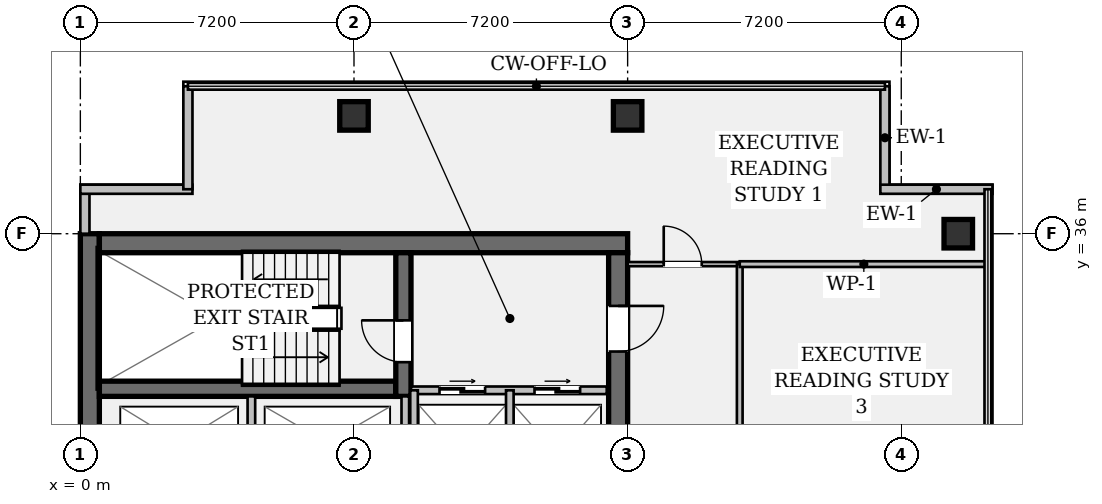
"""IFC4 building model, lengths in metres.
Left out: names, types, materials, properties, quantities, classifications, styles, units other than length and angle.
Written with IfcOpenShell. Run it as: python <this file> out.ifc"""

import sys

from ifc_helpers import new_model, si_unit, direction, frame, frame_2d, origin, origin_2d, place, context, subcontext, project, spatial, rectangle, hollow_rectangle, extrude, element, fill, save


model = new_model("IFC4")
c1 = context("Model", 3, precision=1e-05, world=origin(), true_north=direction((0.0, 1.0)))
c2 = subcontext(c1, "Body", "Model", "MODEL_VIEW")
j1 = project(units=[si_unit("LENGTHUNIT", "METRE"), si_unit("PLANEANGLEUNIT", "RADIAN")], contexts=[c1])
p1 = place(None, origin())
s1 = spatial("IfcSite", under=j1, at=p1, CompositionType="ELEMENT")
p2 = place(p1, origin())
s2 = spatial("IfcBuilding", under=s1, at=p2, CompositionType="ELEMENT")
p3 = place(p2, frame((0.0, 0.0, 225.75)))
s3 = spatial("IfcBuildingStorey", under=s2, at=p3, CompositionType="ELEMENT", Elevation=225.75)
p4 = place(p3, frame((0.25, 7.2, 0.0), z_axis=(0.0, 0.0, 1.0), x_axis=(0.0, 1.0, 0.0)))
e1 = element("IfcWall", 1, at=p4, inside=s3, PredefinedType="SHEAR", context=c2, shape_type="SweptSolid", body=[
    extrude(rectangle(XDim=28.8, YDim=0.5, at=frame_2d((14.4, 0.0))), origin(), (0.0, 0.0, 1.0), 3.24),
])
p5 = place(p3, frame((0.5, 35.75, 0.0), z_axis=(0.0, 0.0, 1.0), x_axis=(1.0, 0.0, 0.0)))
e2 = element("IfcWall", 2, at=p5, inside=s3, PredefinedType="SHEAR", context=c2, shape_type="SweptSolid", body=[
    extrude(rectangle(XDim=13.9, YDim=0.5, at=frame_2d((6.95, 0.0))), origin(), (0.0, 0.0, 1.0), 3.24),
])
p6 = place(p3, frame((14.15, 35.5, 0.0), z_axis=(0.0, 0.0, 1.0), x_axis=(0.0, -1.0, 0.0)))
e3 = element("IfcWall", 3, at=p6, inside=s3, PredefinedType="SHEAR", context=c2, shape_type="SweptSolid", body=[
    extrude(rectangle(XDim=27.8, YDim=0.5, at=frame_2d((13.9, 0.0))), origin(), (0.0, 0.0, 1.0), 3.24),
])
p7 = place(p6, frame((1.4, 0.0, 0.0)))
e4 = element("IfcOpeningElement", 4, at=p7, cuts=e3, PredefinedType="OPENING", context=c2, shape_type="SweptSolid", body=[
    extrude(rectangle(XDim=1.2, YDim=2.15, at=frame_2d((0.6, 1.075))), frame((0.0, 0.262, 0.0), z_axis=(0.0, -1.0, 0.0), x_axis=(1.0, 0.0, 0.0)), (0.0, 0.0, 1.0), 0.524),
])
p8 = place(p6, frame((25.35, 0.0, 0.0)))
e5 = element("IfcOpeningElement", 5, at=p8, cuts=e3, PredefinedType="OPENING", context=c2, shape_type="SweptSolid", body=[
    extrude(rectangle(XDim=1.2, YDim=2.15, at=frame_2d((0.6, 1.075))), frame((0.0, 0.262, 0.0), z_axis=(0.0, -1.0, 0.0), x_axis=(1.0, 0.0, 0.0)), (0.0, 0.0, 1.0), 0.524),
])
p9 = place(p6, frame((14.7, 0.0, 0.0)))
e6 = element("IfcOpeningElement", 6, at=p9, cuts=e3, PredefinedType="OPENING", context=c2, shape_type="SweptSolid", body=[
    extrude(rectangle(XDim=1.6, YDim=2.2, at=frame_2d((0.8, 1.1))), frame((0.0, 0.262, 0.0), z_axis=(0.0, -1.0, 0.0), x_axis=(1.0, 0.0, 0.0)), (0.0, 0.0, 1.0), 0.524),
])
p10 = place(p3, frame((0.5, 31.92, 0.0), z_axis=(0.0, 0.0, 1.0), x_axis=(1.0, 0.0, 0.0)))
e7 = element("IfcWall", 7, at=p10, inside=s3, PredefinedType="SHEAR", context=c2, shape_type="SweptSolid", body=[
    extrude(rectangle(XDim=7.8, YDim=0.4, at=frame_2d((3.9, 0.0))), origin(), (0.0, 0.0, 1.0), 3.24),
])
p11 = place(p3, frame((8.5, 31.72, 0.0), z_axis=(0.0, 0.0, 1.0), x_axis=(0.0, 1.0, 0.0)))
e8 = element("IfcWall", 8, at=p11, inside=s3, PredefinedType="SHEAR", context=c2, shape_type="SweptSolid", body=[
    extrude(rectangle(XDim=3.78, YDim=0.4, at=frame_2d((1.89, 0.0))), origin(), (0.0, 0.0, 1.0), 3.24),
])
p12 = place(p11, frame((0.9, 0.0, 0.0)))
e9 = element("IfcOpeningElement", 9, at=p12, cuts=e8, PredefinedType="OPENING", context=c2, shape_type="SweptSolid", body=[
    extrude(rectangle(XDim=1.1, YDim=2.15, at=frame_2d((0.55, 1.075))), frame((0.0, 0.212, 0.0), z_axis=(0.0, -1.0, 0.0), x_axis=(1.0, 0.0, 0.0)), (0.0, 0.0, 1.0), 0.424),
])
for number, where, z_axis, x_axis in (
    (10, (7.2, 39.1, 0.0), (0.0, 0.0, 1.0), (1.0, 0.0, 0.0)),
    (11, (14.4, 39.1, 0.0), (0.0, 0.0, 1.0), (1.0, 0.0, 0.0)),
    (12, (23.1, 36.0, 0.0), (0.0, 0.0, 1.0), (1.0, 0.0, 0.0)),
):
    element("IfcColumn", number, at=place(p3, frame(where, z_axis=z_axis, x_axis=x_axis)), inside=s3, PredefinedType="COLUMN", context=c2, shape_type="SweptSolid", body=[
        extrude(hollow_rectangle(XDim=0.75, YDim=0.75, WallThickness=0.045, at=origin_2d()), origin(), (0.0, 0.0, 1.0), 3.24),
    ])
p13 = place(p3, frame((0.12, 36.0, 0.0), z_axis=(0.0, 0.0, 1.0), x_axis=(0.0, 1.0, 0.0)))
e13 = element("IfcWall", 13, at=p13, inside=s3, PredefinedType="STANDARD", context=c2, shape_type="SweptSolid", body=[
    extrude(rectangle(XDim=1.17, YDim=0.24, at=frame_2d((0.585, 0.0))), origin(), (0.0, 0.0, 1.0), 3.24),
])
p14 = place(p3, frame((0.0, 37.17, 0.0), z_axis=(0.0, 0.0, 1.0), x_axis=(1.0, 0.0, 0.0)))
e14 = element("IfcWall", 14, at=p14, inside=s3, PredefinedType="STANDARD", context=c2, shape_type="SweptSolid", body=[
    extrude(rectangle(XDim=2.95, YDim=0.24, at=frame_2d((1.475, 0.0))), origin(), (0.0, 0.0, 1.0), 3.24),
])
for number, where, z_axis, x_axis in (
    (15, (2.83, 37.17, 0.0), (0.0, 0.0, 1.0), (0.0, 1.0, 0.0)),
    (16, (21.17, 39.88, 0.0), (0.0, 0.0, 1.0), (0.0, -1.0, 0.0)),
):
    element("IfcWall", number, at=place(p3, frame(where, z_axis=z_axis, x_axis=x_axis)), inside=s3, PredefinedType="STANDARD", context=c2, shape_type="SweptSolid", body=[
        extrude(rectangle(XDim=2.71, YDim=0.24, at=frame_2d((1.355, 0.0))), origin(), (0.0, 0.0, 1.0), 3.24),
    ])
p15 = place(p3, frame((21.05, 37.17, 0.0), z_axis=(0.0, 0.0, 1.0), x_axis=(1.0, 0.0, 0.0)))
e17 = element("IfcWall", 17, at=p15, inside=s3, PredefinedType="STANDARD", context=c2, shape_type="SweptSolid", body=[
    extrude(rectangle(XDim=2.95, YDim=0.24, at=frame_2d((1.475, 0.0))), origin(), (0.0, 0.0, 1.0), 3.24),
])
p16 = place(p3, frame((8.7, 31.88, 0.0), z_axis=(0.0, 0.0, 1.0), x_axis=(1.0, 0.0, 0.0)))
e18 = element("IfcWall", 18, at=p16, inside=s3, PredefinedType="PARTITIONING", context=c2, shape_type="SweptSolid", body=[
    extrude(rectangle(XDim=5.15, YDim=0.2, at=frame_2d((2.575, 0.0))), origin(), (0.0, 0.0, 1.0), 3.24),
])
p17 = place(p16, frame((0.75, 0.0, 0.0)))
e19 = element("IfcOpeningElement", 19, at=p17, cuts=e18, PredefinedType="OPENING", context=c2, shape_type="SweptSolid", body=[
    extrude(rectangle(XDim=1.2, YDim=2.2, at=frame_2d((0.6, 1.1))), frame((0.0, 0.112, 0.0), z_axis=(0.0, -1.0, 0.0), x_axis=(1.0, 0.0, 0.0)), (0.0, 0.0, 1.0), 0.224),
])
p18 = place(p16, frame((3.25, 0.0, 0.0)))
e20 = element("IfcOpeningElement", 20, at=p18, cuts=e18, PredefinedType="OPENING", context=c2, shape_type="SweptSolid", body=[
    extrude(rectangle(XDim=1.2, YDim=2.2, at=frame_2d((0.6, 1.1))), frame((0.0, 0.112, 0.0), z_axis=(0.0, -1.0, 0.0), x_axis=(1.0, 0.0, 0.0)), (0.0, 0.0, 1.0), 0.224),
])
for number, where, z_axis, x_axis in (
    (21, (8.78, 28.78, 0.0), (0.0, 0.0, 1.0), (0.0, 1.0, 0.0)),
    (22, (11.3, 28.78, 0.0), (0.0, 0.0, 1.0), (0.0, 1.0, 0.0)),
):
    element("IfcWall", number, at=place(p3, frame(where, z_axis=z_axis, x_axis=x_axis)), inside=s3, PredefinedType="PARTITIONING", context=c2, shape_type="SweptSolid", body=[
        extrude(rectangle(XDim=3.1, YDim=0.2, at=frame_2d((1.55, 0.0))), origin(), (0.0, 0.0, 1.0), 3.24),
    ])
for number, where, z_axis, x_axis in (
    (23, (4.5, 28.78, 0.0), (0.0, 0.0, 1.0), (0.0, 1.0, 0.0)),
    (24, (8.55, 28.78, 0.0), (0.0, 0.0, 1.0), (0.0, 1.0, 0.0)),
):
    element("IfcWall", number, at=place(p3, frame(where, z_axis=z_axis, x_axis=x_axis)), inside=s3, PredefinedType="PARTITIONING", context=c2, shape_type="SweptSolid", body=[
        extrude(rectangle(XDim=2.94, YDim=0.2, at=frame_2d((1.47, 0.0))), origin(), (0.0, 0.0, 1.0), 3.24),
    ])
p19 = place(p3, frame((14.4, 35.2, 0.0), z_axis=(0.0, 0.0, 1.0), x_axis=(1.0, 0.0, 0.0)))
e25 = element("IfcWall", 25, at=p19, inside=s3, PredefinedType="PARTITIONING", context=c2, shape_type="SweptSolid", body=[
    extrude(rectangle(XDim=2.95, YDim=0.11, at=frame_2d((1.475, 0.0))), origin(), (0.0, 0.0, 1.0), 2.808),
])
p20 = place(p19, frame((0.95, 0.0, 0.0)))
e26 = element("IfcOpeningElement", 26, at=p20, cuts=e25, PredefinedType="OPENING", context=c2, shape_type="SweptSolid", body=[
    extrude(rectangle(XDim=1.0, YDim=2.15, at=frame_2d((0.5, 1.075))), frame((0.0, 0.067, 0.0), z_axis=(0.0, -1.0, 0.0), x_axis=(1.0, 0.0, 0.0)), (0.0, 0.0, 1.0), 0.134),
])
p21 = place(p3, frame((17.35, 12.15, 0.0), z_axis=(0.0, 0.0, 1.0), x_axis=(0.0, 1.0, 0.0)))
e27 = element("IfcWall", 27, at=p21, inside=s3, PredefinedType="PARTITIONING", context=c2, shape_type="SweptSolid", body=[
    extrude(rectangle(XDim=23.05, YDim=0.15, at=frame_2d((11.525, 0.0))), origin(), (0.0, 0.0, 1.0), 2.613),
])
p22 = place(p21, frame((4.3, 0.0, 0.0)))
e28 = element("IfcOpeningElement", 28, at=p22, cuts=e27, PredefinedType="OPENING", context=c2, shape_type="SweptSolid", body=[
    extrude(rectangle(XDim=0.88, YDim=2.15, at=frame_2d((0.44, 1.075))), frame((0.0, 0.087, 0.0), z_axis=(0.0, -1.0, 0.0), x_axis=(1.0, 0.0, 0.0)), (0.0, 0.0, 1.0), 0.174),
])
p23 = place(p21, frame((8.0, 0.0, 0.0)))
e29 = element("IfcOpeningElement", 29, at=p23, cuts=e27, PredefinedType="OPENING", context=c2, shape_type="SweptSolid", body=[
    extrude(rectangle(XDim=0.88, YDim=2.15, at=frame_2d((0.44, 1.075))), frame((0.0, 0.087, 0.0), z_axis=(0.0, -1.0, 0.0), x_axis=(1.0, 0.0, 0.0)), (0.0, 0.0, 1.0), 0.174),
])
p24 = place(p21, frame((16.32, 0.0, 0.0)))
e30 = element("IfcOpeningElement", 30, at=p24, cuts=e27, PredefinedType="OPENING", context=c2, shape_type="SweptSolid", body=[
    extrude(rectangle(XDim=0.88, YDim=2.15, at=frame_2d((0.44, 1.075))), frame((0.0, 0.087, 0.0), z_axis=(0.0, -1.0, 0.0), x_axis=(1.0, 0.0, 0.0)), (0.0, 0.0, 1.0), 0.174),
])
p25 = place(p3, frame((17.35, 35.2, 0.0), z_axis=(0.0, 0.0, 1.0), x_axis=(1.0, 0.0, 0.0)))
e31 = element("IfcWall", 31, at=p25, inside=s3, PredefinedType="PARTITIONING", context=c2, shape_type="SweptSolid", body=[
    extrude(rectangle(XDim=6.53, YDim=0.15, at=frame_2d((3.265, 0.0))), origin(), (0.0, 0.0, 1.0), 2.808),
])
p26 = place(p12, origin())
e32 = element("IfcDoor", 32, at=p26, inside=s3, OperationType="SINGLE_SWING_RIGHT", PredefinedType="DOOR", context=c2, shape_type="SweptSolid", body=[
    extrude(rectangle(XDim=1.1, YDim=2.15, at=frame_2d((0.55, 1.075))), frame((0.0, 0.025, 0.0), z_axis=(0.0, -1.0, 0.0), x_axis=(1.0, 0.0, 0.0)), (0.0, 0.0, 1.0), 0.05),
])
fill(e9, e32)
p27 = place(p7, origin())
e33 = element("IfcDoor", 33, at=p27, inside=s3, OperationType="SINGLE_SWING_LEFT", PredefinedType="DOOR", context=c2, shape_type="SweptSolid", body=[
    extrude(rectangle(XDim=1.2, YDim=2.15, at=frame_2d((0.6, 1.075))), frame((0.0, 0.025, 0.0), z_axis=(0.0, -1.0, 0.0), x_axis=(1.0, 0.0, 0.0)), (0.0, 0.0, 1.0), 0.05),
])
fill(e4, e33)
p28 = place(p17, origin())
e34 = element("IfcDoor", 34, at=p28, inside=s3, OperationType="DOUBLE_DOOR_SLIDING", PredefinedType="DOOR", context=c2, shape_type="SweptSolid", body=[
    extrude(rectangle(XDim=1.2, YDim=2.2, at=frame_2d((0.6, 1.1))), frame((0.0, 0.025, 0.0), z_axis=(0.0, -1.0, 0.0), x_axis=(1.0, 0.0, 0.0)), (0.0, 0.0, 1.0), 0.05),
])
fill(e19, e34)
p29 = place(p18, origin())
e35 = element("IfcDoor", 35, at=p29, inside=s3, OperationType="DOUBLE_DOOR_SLIDING", PredefinedType="DOOR", context=c2, shape_type="SweptSolid", body=[
    extrude(rectangle(XDim=1.2, YDim=2.2, at=frame_2d((0.6, 1.1))), frame((0.0, 0.025, 0.0), z_axis=(0.0, -1.0, 0.0), x_axis=(1.0, 0.0, 0.0)), (0.0, 0.0, 1.0), 0.05),
])
fill(e20, e35)
p30 = place(p20, origin())
e36 = element("IfcDoor", 36, at=p30, inside=s3, OperationType="SINGLE_SWING_LEFT", PredefinedType="DOOR", context=c2, shape_type="SweptSolid", body=[
    extrude(rectangle(XDim=1.0, YDim=2.15, at=frame_2d((0.5, 1.075))), frame((0.0, 0.025, 0.0), z_axis=(0.0, -1.0, 0.0), x_axis=(1.0, 0.0, 0.0)), (0.0, 0.0, 1.0), 0.05),
])
fill(e26, e36)
save(model, sys.argv[1])
